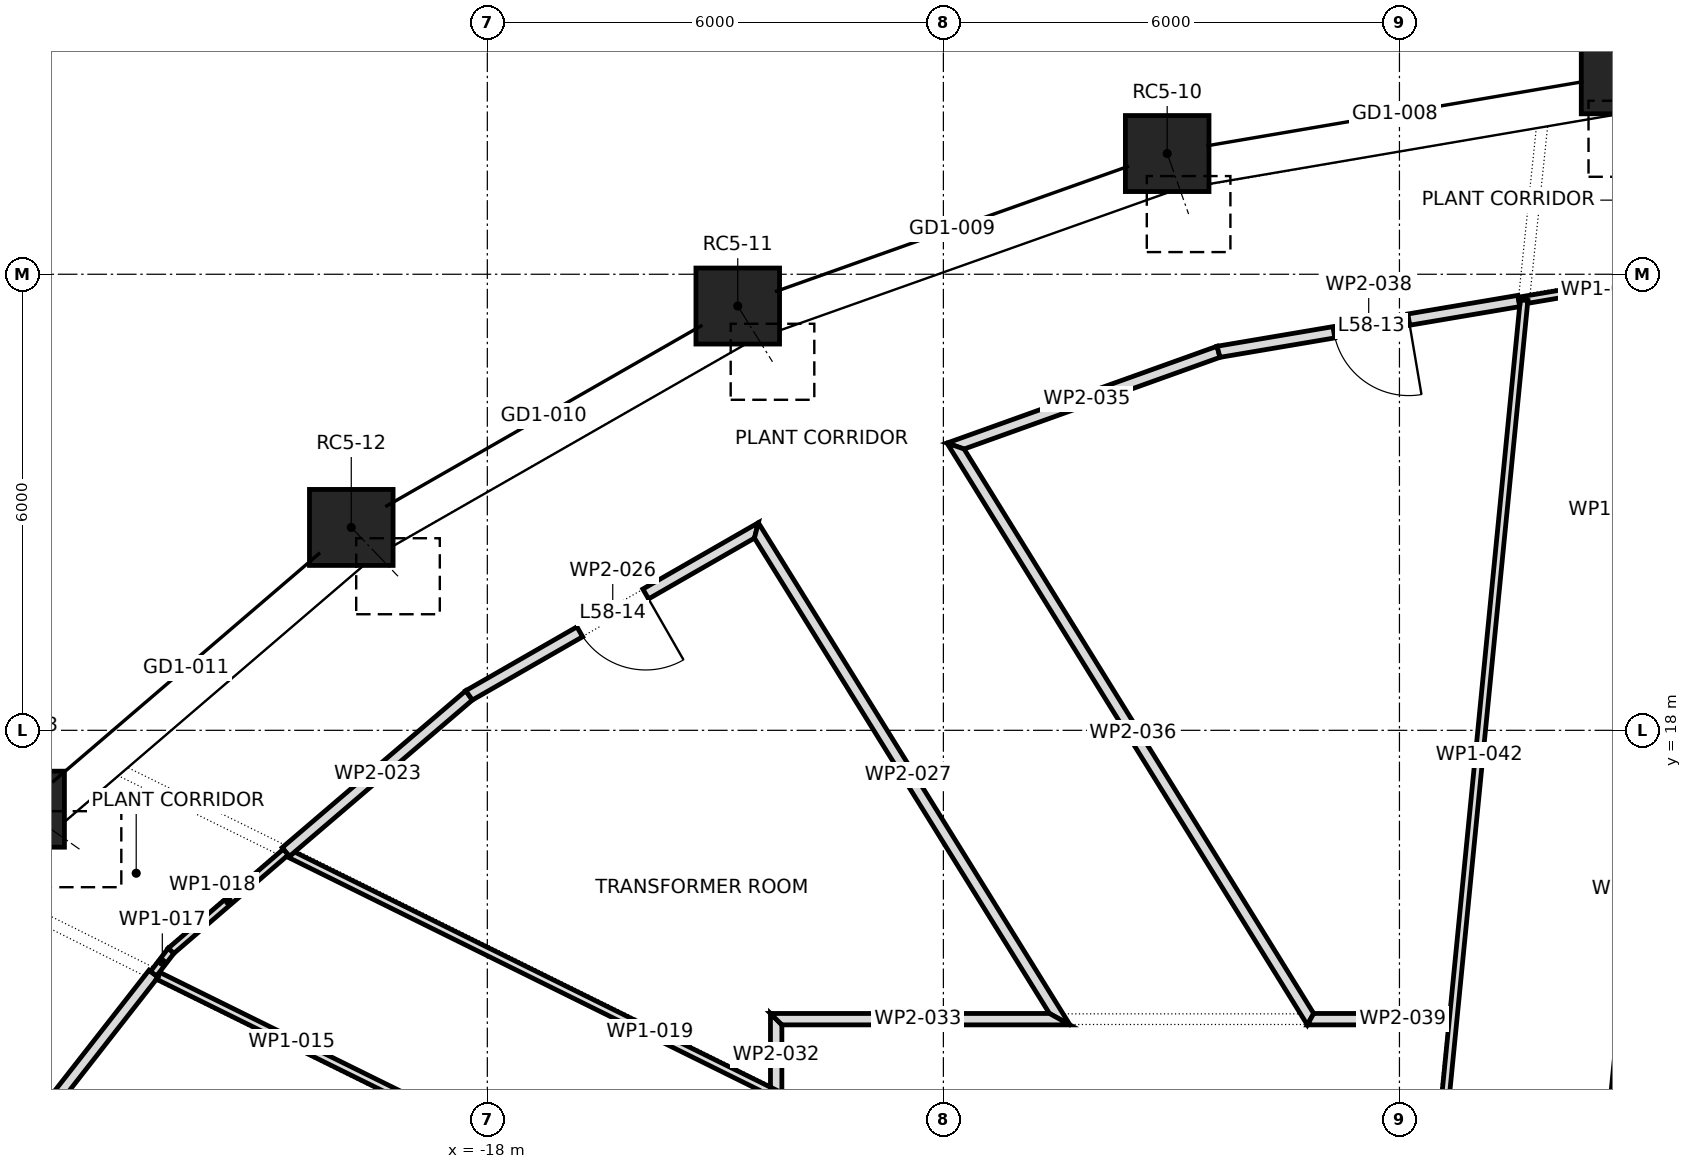
"""IFC4 building model, lengths in metres.
Left out: names, types, materials, properties, quantities, classifications, styles, units other than length and angle.
Written with IfcOpenShell. Run it as: python <this file> out.ifc"""

import sys

from ifc_helpers import new_model, si_unit, direction, frame, frame_2d, origin, origin_2d, place, context, subcontext, project, spatial, polyline, rectangle, outline, extrude, element, fill, save


model = new_model("IFC4")
c1 = context("Model", 3, precision=1e-05, world=origin(), true_north=direction((0.0, 1.0)))
c2 = subcontext(c1, "Body", "Model", "MODEL_VIEW")
j1 = project(units=[si_unit("LENGTHUNIT", "METRE"), si_unit("PLANEANGLEUNIT", "RADIAN")], contexts=[c1])
p1 = place(None, origin())
s1 = spatial("IfcSite", under=j1, at=p1, CompositionType="ELEMENT")
p2 = place(p1, origin())
s2 = spatial("IfcBuilding", under=s1, at=p2, CompositionType="ELEMENT")
p3 = place(p2, frame((0.0, 0.0, 250.9)))
s3 = spatial("IfcBuildingStorey", under=s2, at=p3, CompositionType="ELEMENT", Elevation=250.9)
p4 = place(p3, frame((-3.058, 26.611, 0.078), z_axis=(0.017979718295, -0.155977505007, 0.987596956082), x_axis=(0.993421756162, 0.11451294418, 0.0)))
e1 = element("IfcColumn", 1, at=p4, inside=s3, PredefinedType="COLUMN", context=c2, shape_type="SweptSolid", body=[
    extrude(rectangle(XDim=1.1, YDim=1.0, at=origin_2d()), origin(), (0.0, 0.0, 1.0), 5.309),
])
p5 = place(p3, frame((-9.056, 25.588, 0.079), z_axis=(0.053067495482, -0.149959361151, 0.987266950184), x_axis=(0.942712482292, 0.333606318481, 0.0)))
e2 = element("IfcColumn", 2, at=p5, inside=s3, PredefinedType="COLUMN", context=c2, shape_type="SweptSolid", body=[
    extrude(rectangle(XDim=1.1, YDim=1.0, at=origin_2d()), origin(), (0.0, 0.0, 1.0), 5.309),
])
p6 = place(p3, frame((-14.705, 23.582, 0.081), z_axis=(0.086092626008, -0.138152910538, 0.986661964939), x_axis=(0.848695936688, 0.528881089707, 0.0)))
e3 = element("IfcColumn", 3, at=p6, inside=s3, PredefinedType="COLUMN", context=c2, shape_type="SweptSolid", body=[
    extrude(rectangle(XDim=1.1, YDim=1.0, at=origin_2d()), origin(), (0.0, 0.0, 1.0), 5.309),
])
p7 = place(p3, frame((-19.79, 20.669, 0.083), z_axis=(0.115812481815, -0.12096379157, 0.985877898213), x_axis=(0.722319686129, 0.691559304059, 0.0)))
e4 = element("IfcColumn", 4, at=p7, inside=s3, PredefinedType="COLUMN", context=c2, shape_type="SweptSolid", body=[
    extrude(rectangle(XDim=1.1, YDim=1.0, at=origin_2d()), origin(), (0.0, 0.0, 1.0), 5.308),
])
p8 = place(p3, frame((-24.114, 16.962, 0.086), z_axis=(0.14102688006, -0.099169586892, 0.985026300226), x_axis=(0.575215805529, 0.818001697473, 0.0)))
e5 = element("IfcColumn", 5, at=p8, inside=s3, PredefinedType="COLUMN", context=c2, shape_type="SweptSolid", body=[
    extrude(rectangle(XDim=1.1, YDim=1.0, at=origin_2d()), origin(), (0.0, 0.0, 1.0), 5.308),
])
p9 = place(p3, frame((-22.391, 14.798, 0.0), z_axis=(0.0, 0.0, 1.0), x_axis=(-0.615933342792, -0.787798271918, 0.0)))
e6 = element("IfcWall", 6, at=p9, inside=s3, PredefinedType="PARTITIONING", context=c2, shape_type="SweptSolid", body=[
    extrude(outline(polyline([(0.0, -0.075), (1.534, -0.075), (3.067, -0.075), (4.601, -0.075), (4.585, 0.075), (3.057, 0.075), (1.528, 0.075), (0.0, 0.075), (0.0, -0.075)])), origin(), (0.0, 0.0, 1.0), 5.1),
])
p10 = place(p3, frame((-22.335, 14.773, 0.0), z_axis=(0.0, 0.0, 1.0), x_axis=(0.896802594661, -0.442430905577, 0.0)))
e7 = element("IfcWall", 7, at=p10, inside=s3, PredefinedType="PARTITIONING", context=c2, shape_type="SweptSolid", body=[
    extrude(outline(polyline([(0.0, 0.05), (0.0, -0.015), (0.012, -0.017), (0.005, -0.05), (1.965, -0.05), (3.926, -0.05), (3.926, 0.05), (1.963, 0.05), (0.0, 0.05)])), origin(), (0.0, 0.0, 1.0), 5.1),
])
p11 = place(p3, frame((-22.157, 15.104, 0.0), z_axis=(0.0, 0.0, 1.0), x_axis=(-0.608085380433, -0.793871633266, 0.0)))
e8 = element("IfcWall", 8, at=p11, inside=s3, PredefinedType="PARTITIONING", context=c2, shape_type="SweptSolid", body=[
    extrude(outline(polyline([(0.0, -0.05), (0.385, -0.05), (0.385, -0.002), (0.385, 0.05), (0.323, 0.05), (0.322, 0.05), (0.322, 0.05), (0.01, 0.05), (0.01, 0.05), (0.01, 0.05), (0.005, 0.0), (0.0, -0.048), (0.0, -0.05)])), origin(), (0.0, 0.0, 1.0), 5.1),
])
p12 = place(p3, frame((-20.65, 16.4, 0.0), z_axis=(0.0, 0.0, 1.0), x_axis=(-0.757874548708, -0.652400313014, 0.0)))
e9 = element("IfcWall", 9, at=p12, inside=s3, PredefinedType="PARTITIONING", context=c2, shape_type="SweptSolid", body=[
    extrude(outline(polyline([(1.998, -0.05), (1.998, -0.049), (1.987, 0.05), (0.0, 0.05), (0.0, -0.05), (1.998, -0.05)])), origin(), (0.0, 0.0, 1.0), 5.1),
])
p13 = place(p3, frame((-20.62, 16.385, 0.0), z_axis=(0.0, 0.0, 1.0), x_axis=(0.896490791299, -0.443062367073, 0.0)))
e10 = element("IfcWall", 10, at=p13, inside=s3, PredefinedType="PARTITIONING", context=c2, shape_type="SweptSolid", body=[
    extrude(outline(polyline([(10.575, 0.05), (8.817, 0.05), (7.059, 0.05), (7.054, 0.048), (7.053, 0.05), (5.307, 0.05), (3.561, 0.05), (1.815, 0.05), (0.07, 0.05), (0.036, -0.03), (0.013, -0.02), (0.0, -0.05), (0.0, -0.05), (1.762, -0.05), (3.525, -0.05), (5.287, -0.05), (7.05, -0.05), (8.812, -0.05), (10.575, -0.05), (10.575, 0.05)])), origin(), (0.0, 0.0, 1.0), 5.1),
])
p14 = place(p3, frame((-18.235, 18.465, 0.0), z_axis=(0.0, 0.0, 1.0), x_axis=(-0.76011828392, -0.649784729315, 0.0)))
e11 = element("IfcWall", 11, at=p14, inside=s3, PredefinedType="PARTITIONING", context=c2, shape_type="SweptSolid", body=[
    extrude(outline(polyline([(3.177, 0.075), (1.596, 0.075), (0.014, 0.075), (0.0, -0.075), (1.589, -0.075), (3.177, -0.075), (3.177, 0.075)])), origin(), (0.0, 0.0, 1.0), 5.1),
])
p15 = place(p3, frame((-14.397, 20.666, 0.0), z_axis=(0.0, 0.0, 1.0), x_axis=(-0.867259694759, -0.497856025219, 0.0)))
e12 = element("IfcWall", 12, at=p15, inside=s3, PredefinedType="PARTITIONING", context=c2, shape_type="SweptSolid", body=[
    extrude(outline(polyline([(0.0, -0.075), (1.479, -0.075), (2.959, -0.075), (4.438, -0.075), (4.424, 0.075), (2.998, 0.075), (1.571, 0.075), (0.145, 0.075), (0.0, -0.075), (0.0, -0.075)])), origin(), (0.0, 0.0, 1.0), 5.1),
])
p16 = place(p15, frame((1.752, 0.0, 0.0)))
e13 = element("IfcOpeningElement", 13, at=p16, cuts=e12, PredefinedType="OPENING", context=c2, shape_type="SweptSolid", body=[
    extrude(rectangle(XDim=1.0, YDim=2.1, at=frame_2d((0.5, 1.05))), frame((0.0, 0.087, 0.0), z_axis=(0.0, -1.0, 0.0), x_axis=(1.0, 0.0, 0.0)), (0.0, 0.0, 1.0), 0.174),
])
p17 = place(p3, frame((-14.498, 20.692, 0.0), z_axis=(0.0, 0.0, 1.0), x_axis=(0.527266712456, -0.849699837552, 0.0)))
e14 = element("IfcWall", 14, at=p17, inside=s3, PredefinedType="PARTITIONING", context=c2, shape_type="SweptSolid", body=[
    extrude(outline(polyline([(0.145, -0.075), (1.985, -0.075), (3.825, -0.075), (5.665, -0.075), (7.505, -0.075), (7.775, 0.075), (5.831, 0.075), (3.887, 0.075), (1.944, 0.075), (0.0, 0.075), (0.145, -0.075)])), origin(), (0.0, 0.0, 1.0), 5.1),
])
p18 = place(p3, frame((-14.2, 13.231, 0.0), z_axis=(0.0, 0.0, 1.0), x_axis=(0.0, 1.0, 0.0)))
e15 = element("IfcWall", 15, at=p18, inside=s3, PredefinedType="PARTITIONING", context=c2, shape_type="SweptSolid", body=[
    extrude(outline(polyline([(0.0, -0.075), (0.894, -0.075), (1.043, 0.075), (0.074, 0.075), (0.0, -0.074), (0.0, -0.075)])), origin(), (0.0, 0.0, 1.0), 5.1),
])
p19 = place(p3, frame((-14.275, 14.2, 0.0), z_axis=(0.0, 0.0, 1.0), x_axis=(1.0, 0.0, 0.0)))
e16 = element("IfcWall", 16, at=p19, inside=s3, PredefinedType="PARTITIONING", context=c2, shape_type="SweptSolid", body=[
    extrude(outline(polyline([(3.94, -0.075), (3.94, -0.075), (3.67, 0.075), (1.835, 0.075), (0.0, 0.075), (0.15, -0.075), (2.045, -0.075), (3.94, -0.075)])), origin(), (0.0, 0.0, 1.0), 5.1),
])
p20 = place(p3, frame((-11.927, 21.709, 0.0), z_axis=(0.0, 0.0, 1.0), x_axis=(0.941377000875, 0.337356402375, 0.0)))
e17 = element("IfcWall", 17, at=p20, inside=s3, PredefinedType="PARTITIONING", context=c2, shape_type="SweptSolid", body=[
    extrude(outline(polyline([(0.185, -0.075), (1.973, -0.075), (3.761, -0.075), (3.775, 0.073), (3.775, 0.075), (1.887, 0.075), (0.0, 0.075), (0.185, -0.075)])), origin(), (0.0, 0.0, 1.0), 5.1),
])
p21 = place(p3, frame((-11.889, 21.819, 0.0), z_axis=(0.0, 0.0, 1.0), x_axis=(0.526562768586, -0.85013625422, 0.0)))
e18 = element("IfcWall", 18, at=p21, inside=s3, PredefinedType="PARTITIONING", context=c2, shape_type="SweptSolid", body=[
    extrude(outline(polyline([(0.0, -0.075), (1.801, -0.075), (3.602, -0.075), (5.402, -0.075), (7.203, -0.075), (9.004, -0.075), (8.92, 0.075), (7.173, 0.075), (5.426, 0.075), (3.679, 0.075), (1.932, 0.075), (0.185, 0.075), (0.0, -0.075)])), origin(), (0.0, 0.0, 1.0), 5.1),
])
p22 = place(p3, frame((-8.386, 22.979, 0.0), z_axis=(0.0, 0.0, 1.0), x_axis=(0.986003200339, 0.166726389397, 0.0)))
e19 = element("IfcWall", 19, at=p22, inside=s3, PredefinedType="PARTITIONING", context=c2, shape_type="SweptSolid", body=[
    extrude(outline(polyline([(0.0, 0.075), (0.0, 0.074), (0.013, -0.075), (1.347, -0.075), (2.68, -0.075), (4.014, -0.075), (4.014, 0.075), (2.676, 0.075), (1.338, 0.075), (0.0, 0.075)])), origin(), (0.0, 0.0, 1.0), 5.1),
])
p23 = place(p22, frame((1.545, 0.0, 0.0)))
e20 = element("IfcOpeningElement", 20, at=p23, cuts=e19, PredefinedType="OPENING", context=c2, shape_type="SweptSolid", body=[
    extrude(rectangle(XDim=1.0, YDim=2.1, at=frame_2d((0.5, 1.05))), frame((0.0, 0.087, 0.0), z_axis=(0.0, -1.0, 0.0), x_axis=(1.0, 0.0, 0.0)), (0.0, 0.0, 1.0), 0.174),
])
p24 = place(p3, frame((-7.212, 14.2, 0.0), z_axis=(0.0, 0.0, 1.0), x_axis=(1.0, 0.0, 0.0)))
e21 = element("IfcWall", 21, at=p24, inside=s3, PredefinedType="PARTITIONING", context=c2, shape_type="SweptSolid", body=[
    extrude(outline(polyline([(0.0, -0.075), (1.861, -0.075), (1.875, 0.073), (1.875, 0.075), (0.084, 0.075), (0.042, 0.0), (0.0, -0.075)])), origin(), (0.0, 0.0, 1.0), 5.1),
])
p25 = place(p3, frame((-5.54, 11.7, 0.0), z_axis=(0.0, 0.0, 1.0), x_axis=(0.098192347243, 0.995167454725, 0.0)))
e22 = element("IfcWall", 22, at=p25, inside=s3, PredefinedType="PARTITIONING", context=c2, shape_type="SweptSolid", body=[
    extrude(rectangle(XDim=12.019, YDim=0.1, at=frame_2d((6.01, 0.0))), origin(), (0.0, 0.0, 1.0), 5.1),
])
p26 = place(p3, frame((-3.32, 11.7, 0.0), z_axis=(0.0, 0.0, 1.0), x_axis=(0.0995179867, 0.995035763339, 0.0)))
e23 = element("IfcWall", 23, at=p26, inside=s3, PredefinedType="PARTITIONING", context=c2, shape_type="SweptSolid", body=[
    extrude(outline(polyline([(0.0, -0.05), (1.295, -0.05), (2.59, -0.05), (2.593, -0.05), (2.593, -0.05), (4.552, -0.05), (6.512, -0.05), (8.471, -0.05), (8.471, 0.05), (6.777, 0.05), (5.083, 0.05), (3.388, 0.05), (1.694, 0.05), (0.0, 0.05), (0.0, -0.05)])), origin(), (0.0, 0.0, 1.0), 5.1),
])
p27 = place(p3, frame((-2.826, 23.921, 0.0), z_axis=(0.0, 0.0, 1.0), x_axis=(-0.985865518692, -0.167538589746, 0.0)))
e24 = element("IfcWall", 24, at=p27, inside=s3, PredefinedType="PARTITIONING", context=c2, shape_type="SweptSolid", body=[
    extrude(outline(polyline([(1.626, 0.05), (1.622, 0.05), (1.604, -0.014), (1.508, 0.012), (1.518, 0.05), (0.009, 0.05), (0.009, 0.05), (0.009, 0.05), (0.004, 0.0), (0.0, -0.05), (1.626, -0.05), (1.626, 0.05)])), origin(), (0.0, 0.0, 1.0), 5.1),
])
p28 = place(p23, frame((1.0, 0.0, 0.0), z_axis=(0.0, 0.0, 1.0), x_axis=(-1.0, 0.0, 0.0)))
e25 = element("IfcDoor", 25, at=p28, inside=s3, OperationType="SINGLE_SWING_RIGHT", PredefinedType="DOOR", context=c2, shape_type="SweptSolid", body=[
    extrude(rectangle(XDim=1.0, YDim=2.1, at=frame_2d((0.5, 1.05))), frame((0.0, 0.025, 0.0), z_axis=(0.0, -1.0, 0.0), x_axis=(1.0, 0.0, 0.0)), (0.0, 0.0, 1.0), 0.05),
])
fill(e20, e25)
p29 = place(p16, origin())
e26 = element("IfcDoor", 26, at=p29, inside=s3, OperationType="SINGLE_SWING_RIGHT", PredefinedType="DOOR", context=c2, shape_type="SweptSolid", body=[
    extrude(rectangle(XDim=1.0, YDim=2.1, at=frame_2d((0.5, 1.05))), frame((0.0, 0.025, 0.0), z_axis=(0.0, -1.0, 0.0), x_axis=(1.0, 0.0, 0.0)), (0.0, 0.0, 1.0), 0.05),
])
fill(e13, e26)
save(model, sys.argv[1])
